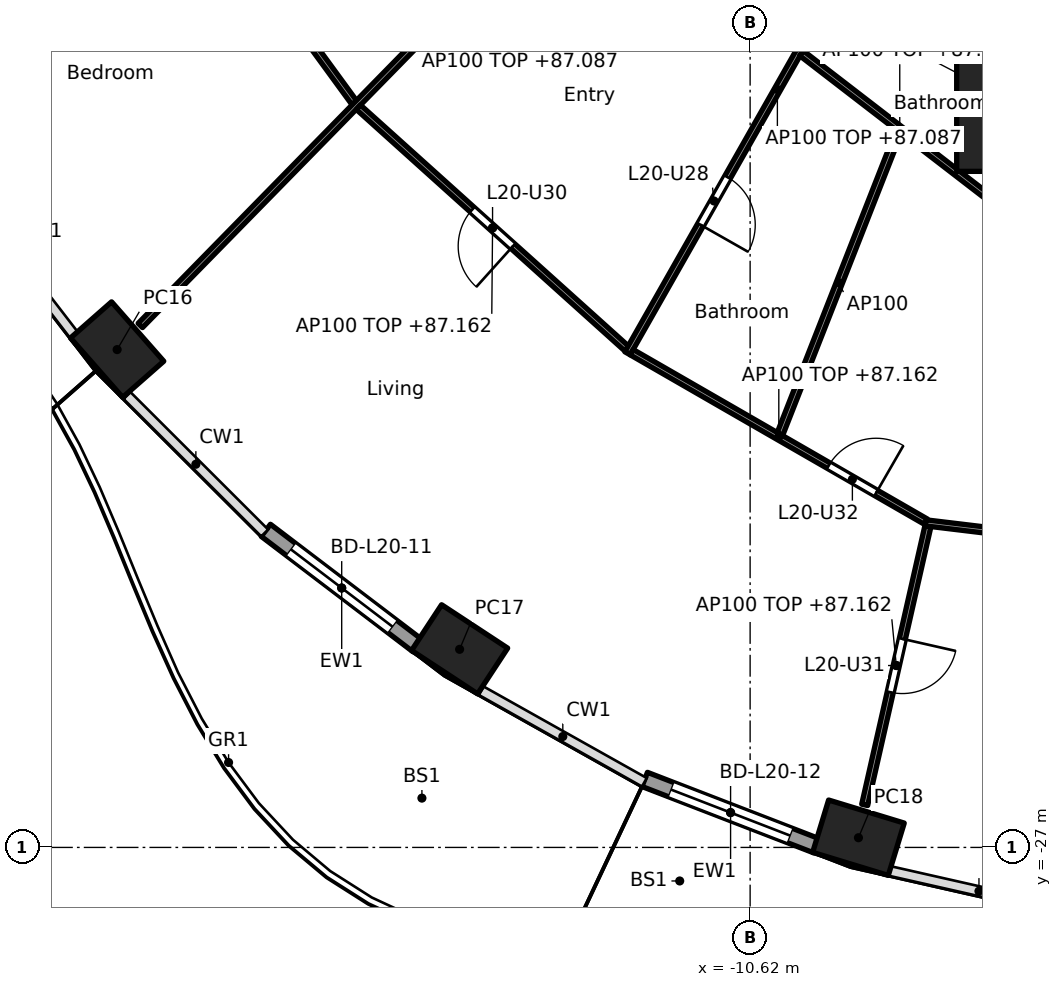
"""IFC4 building model, lengths in metres.
Left out: names, types, materials, properties, quantities, classifications, styles, units other than length and angle.
Written with IfcOpenShell. Run it as: python <this file> out.ifc"""

import sys

from ifc_helpers import new_model, si_unit, direction, frame, frame_2d, origin, origin_2d, place, context, subcontext, project, spatial, rectangle, hollow_rectangle, extrude, element, fill, save


model = new_model("IFC4")
c1 = context("Model", 3, precision=1e-05, world=origin(), true_north=direction((0.0, 1.0)))
c2 = subcontext(c1, "Body", "Model", "MODEL_VIEW")
j1 = project(units=[si_unit("LENGTHUNIT", "METRE"), si_unit("PLANEANGLEUNIT", "RADIAN")], contexts=[c1])
p1 = place(None, origin())
s1 = spatial("IfcSite", under=j1, at=p1, CompositionType="ELEMENT")
p2 = place(p1, origin())
s2 = spatial("IfcBuilding", under=s1, at=p2, CompositionType="ELEMENT")
p3 = place(p2, frame((0.0, 0.0, 84.4)))
s3 = spatial("IfcBuildingStorey", under=s2, at=p3, CompositionType="ELEMENT", Elevation=84.4)
for number, where, z_axis, x_axis in (
    (1, (-21.03, -18.813, 0.0), (0.0, 0.0, 1.0), (0.66, -0.751, 0.0)),
    (2, (-15.397, -23.742, 0.0), (0.0, 0.0, 1.0), (0.836, -0.549, 0.0)),
    (3, (-8.839, -26.841, 0.0), (0.0, 0.0, 1.0), (0.957, -0.292, 0.0)),
):
    element("IfcColumn", number, at=place(p3, frame(where, z_axis=z_axis, x_axis=x_axis)), inside=s3, PredefinedType="COLUMN", context=c2, shape_type="SweptSolid", body=[
        extrude(hollow_rectangle(XDim=1.3, YDim=0.9, WallThickness=0.045, at=origin_2d()), origin(), (0.0, 0.0, 1.0), 3.7),
    ])
p4 = place(p3, frame((-6.123, -14.782, 0.0), z_axis=(0.0, 0.0, 1.0), x_axis=(1.0, 0.0, 0.0)))
e4 = element("IfcColumn", 4, at=p4, inside=s3, PredefinedType="COLUMN", context=c2, shape_type="SweptSolid", body=[
    extrude(rectangle(XDim=2.2, YDim=2.2, at=origin_2d()), origin(), (0.0, 0.0, 1.0), 3.7),
])
p5 = place(p3, frame((-16.089, -23.682, 0.0), z_axis=(0.0, 0.0, 1.0), x_axis=(-0.796037575978, 0.605247203736, 0.0)))
e5 = element("IfcWall", 5, at=p5, inside=s3, PredefinedType="SOLIDWALL", context=c2, shape_type="SweptSolid", body=[
    extrude(rectangle(XDim=3.134, YDim=0.25, at=frame_2d((1.567, 0.0))), origin(), (0.0, 0.0, 1.0), 3.44),
])
p6 = place(p5, frame((0.517, 0.0, 0.0)))
e6 = element("IfcOpeningElement", 6, at=p6, cuts=e5, PredefinedType="OPENING", context=c2, shape_type="SweptSolid", body=[
    extrude(rectangle(XDim=2.1, YDim=2.4, at=frame_2d((1.05, 1.2))), frame((0.0, 0.135, 0.0), z_axis=(0.0, -1.0, 0.0), x_axis=(1.0, 0.0, 0.0)), (0.0, 0.0, 1.0), 0.27),
])
p7 = place(p3, frame((-9.529, -26.973, 0.0), z_axis=(0.0, 0.0, 1.0), x_axis=(-0.932827091302, 0.360324322982, 0.0)))
e7 = element("IfcWall", 7, at=p7, inside=s3, PredefinedType="SOLIDWALL", context=c2, shape_type="SweptSolid", body=[
    extrude(rectangle(XDim=3.027, YDim=0.25, at=frame_2d((1.514, 0.0))), origin(), (0.0, 0.0, 1.0), 3.44),
])
p8 = place(p7, frame((0.464, 0.0, 0.0)))
e8 = element("IfcOpeningElement", 8, at=p8, cuts=e7, PredefinedType="OPENING", context=c2, shape_type="SweptSolid", body=[
    extrude(rectangle(XDim=2.1, YDim=2.4, at=frame_2d((1.05, 1.2))), frame((0.0, 0.135, 0.0), z_axis=(0.0, -1.0, 0.0), x_axis=(1.0, 0.0, 0.0)), (0.0, 0.0, 1.0), 0.27),
])
p9 = place(p3, frame((-20.76, -9.779, 0.0), z_axis=(0.0, 0.0, 1.0), x_axis=(0.589597019189, -0.807697564045, 0.0)))
e9 = element("IfcWall", 9, at=p9, inside=s3, PredefinedType="PARTITIONING", context=c2, shape_type="SweptSolid", body=[
    extrude(rectangle(XDim=6.158, YDim=0.1, at=frame_2d((3.079, 0.0))), origin(), (0.0, 0.0, 1.0), 2.762),
])
p10 = place(p9, frame((2.629, 0.0, 0.0)))
e10 = element("IfcOpeningElement", 10, at=p10, cuts=e9, PredefinedType="OPENING", context=c2, shape_type="SweptSolid", body=[
    extrude(rectangle(XDim=0.9, YDim=2.1, at=frame_2d((0.45, 1.05))), frame((0.0, 0.06, 0.0), z_axis=(0.0, -1.0, 0.0), x_axis=(1.0, 0.0, 0.0)), (0.0, 0.0, 1.0), 0.12),
])
p11 = place(p3, frame((-10.181, -7.729, 0.0), z_axis=(0.0, 0.0, 1.0), x_axis=(-0.699708106083, -0.714428839201, 0.0)))
e11 = element("IfcWall", 11, at=p11, inside=s3, PredefinedType="PARTITIONING", context=c2, shape_type="SweptSolid", body=[
    extrude(rectangle(XDim=14.959, YDim=0.1, at=frame_2d((7.48, 0.0))), origin(), (0.0, 0.0, 1.0), 2.687),
])
p12 = place(p11, frame((1.675, 0.0, 0.0)))
e12 = element("IfcOpeningElement", 12, at=p12, cuts=e11, PredefinedType="OPENING", context=c2, shape_type="SweptSolid", body=[
    extrude(rectangle(XDim=0.9, YDim=2.1, at=frame_2d((0.45, 1.05))), frame((0.0, 0.06, 0.0), z_axis=(0.0, -1.0, 0.0), x_axis=(1.0, 0.0, 0.0)), (0.0, 0.0, 1.0), 0.12),
])
p13 = place(p11, frame((6.619, 0.0, 0.0)))
e13 = element("IfcOpeningElement", 13, at=p13, cuts=e11, PredefinedType="OPENING", context=c2, shape_type="SweptSolid", body=[
    extrude(rectangle(XDim=0.9, YDim=2.1, at=frame_2d((0.45, 1.05))), frame((0.0, 0.06, 0.0), z_axis=(0.0, -1.0, 0.0), x_axis=(1.0, 0.0, 0.0)), (0.0, 0.0, 1.0), 0.12),
])
p14 = place(p3, frame((-17.063, -14.827, 0.0), z_axis=(0.0, 0.0, 1.0), x_axis=(0.743478142868, -0.668760234373, 0.0)))
e14 = element("IfcWall", 14, at=p14, inside=s3, PredefinedType="PARTITIONING", context=c2, shape_type="SweptSolid", body=[
    extrude(rectangle(XDim=5.937, YDim=0.1, at=frame_2d((2.969, 0.0))), origin(), (0.0, 0.0, 1.0), 2.762),
])
p15 = place(p14, frame((2.519, 0.0, 0.0)))
e15 = element("IfcOpeningElement", 15, at=p15, cuts=e14, PredefinedType="OPENING", context=c2, shape_type="SweptSolid", body=[
    extrude(rectangle(XDim=0.9, YDim=2.1, at=frame_2d((0.45, 1.05))), frame((0.0, 0.06, 0.0), z_axis=(0.0, -1.0, 0.0), x_axis=(1.0, 0.0, 0.0)), (0.0, 0.0, 1.0), 0.12),
])
p16 = place(p3, frame((-7.707, -10.198, 0.0), z_axis=(0.0, 0.0, 1.0), x_axis=(-0.493963587489, -0.869482589955, 0.0)))
e16 = element("IfcWall", 16, at=p16, inside=s3, PredefinedType="PARTITIONING", context=c2, shape_type="SweptSolid", body=[
    extrude(rectangle(XDim=9.978, YDim=0.1, at=frame_2d((4.989, 0.0))), origin(), (0.0, 0.0, 1.0), 2.687),
])
p17 = place(p16, frame((1.684, 0.0, 0.0)))
e17 = element("IfcOpeningElement", 17, at=p17, cuts=e16, PredefinedType="OPENING", context=c2, shape_type="SweptSolid", body=[
    extrude(rectangle(XDim=0.9, YDim=2.1, at=frame_2d((0.45, 1.05))), frame((0.0, 0.06, 0.0), z_axis=(0.0, -1.0, 0.0), x_axis=(1.0, 0.0, 0.0)), (0.0, 0.0, 1.0), 0.12),
])
p18 = place(p16, frame((6.648, 0.0, 0.0)))
e18 = element("IfcOpeningElement", 18, at=p18, cuts=e16, PredefinedType="OPENING", context=c2, shape_type="SweptSolid", body=[
    extrude(rectangle(XDim=0.9, YDim=2.1, at=frame_2d((0.45, 1.05))), frame((0.0, 0.06, 0.0), z_axis=(0.0, -1.0, 0.0), x_axis=(1.0, 0.0, 0.0)), (0.0, 0.0, 1.0), 0.12),
])
p19 = place(p3, frame((-9.775, -13.939, 0.0), z_axis=(0.0, 0.0, 1.0), x_axis=(0.792156642473, -0.61031783014, 0.0)))
e19 = element("IfcWall", 19, at=p19, inside=s3, PredefinedType="PARTITIONING", context=c2, shape_type="SweptSolid", body=[
    extrude(rectangle(XDim=4.08, YDim=0.1, at=frame_2d((2.04, 0.0))), origin(), (0.0, 0.0, 1.0), 2.762),
])
p20 = place(p3, frame((-12.568, -18.856, 0.0), z_axis=(0.0, 0.0, 1.0), x_axis=(0.866532513598, -0.499120629585, 0.0)))
e20 = element("IfcWall", 20, at=p20, inside=s3, PredefinedType="PARTITIONING", context=c2, shape_type="SweptSolid", body=[
    extrude(rectangle(XDim=5.585, YDim=0.1, at=frame_2d((2.792, 0.0))), origin(), (0.0, 0.0, 1.0), 2.762),
])
p21 = place(p20, frame((3.739, 0.0, 0.0)))
e21 = element("IfcOpeningElement", 21, at=p21, cuts=e20, PredefinedType="OPENING", context=c2, shape_type="SweptSolid", body=[
    extrude(rectangle(XDim=0.9, YDim=2.1, at=frame_2d((0.45, 1.05))), frame((0.0, 0.06, 0.0), z_axis=(0.0, -1.0, 0.0), x_axis=(1.0, 0.0, 0.0)), (0.0, 0.0, 1.0), 0.12),
])
p22 = place(p3, frame((-8.177, -15.231, 0.0), z_axis=(0.0, 0.0, 1.0), x_axis=(-0.365520869553, -0.930803144559, 0.0)))
e22 = element("IfcWall", 22, at=p22, inside=s3, PredefinedType="PARTITIONING", context=c2, shape_type="SweptSolid", body=[
    extrude(rectangle(XDim=5.342, YDim=0.1, at=frame_2d((2.671, 0.0))), origin(), (0.0, 0.0, 1.0), 3.44),
])
p23 = place(p3, frame((-7.696, -21.717, 0.0), z_axis=(0.0, 0.0, 1.0), x_axis=(-0.221196717441, -0.97522921008, 0.0)))
e23 = element("IfcWall", 23, at=p23, inside=s3, PredefinedType="PARTITIONING", context=c2, shape_type="SweptSolid", body=[
    extrude(rectangle(XDim=4.7, YDim=0.1, at=frame_2d((2.35, 0.0))), origin(), (0.0, 0.0, 1.0), 2.762),
])
p24 = place(p23, frame((1.9, 0.0, 0.0)))
e24 = element("IfcOpeningElement", 24, at=p24, cuts=e23, PredefinedType="OPENING", context=c2, shape_type="SweptSolid", body=[
    extrude(rectangle(XDim=0.9, YDim=2.1, at=frame_2d((0.45, 1.05))), frame((0.0, 0.06, 0.0), z_axis=(0.0, -1.0, 0.0), x_axis=(1.0, 0.0, 0.0)), (0.0, 0.0, 1.0), 0.12),
])
p25 = place(p3, frame((-7.735, -21.662, 0.0), z_axis=(0.0, 0.0, 1.0), x_axis=(0.992808347289, -0.119714600421, 0.0)))
e25 = element("IfcWall", 25, at=p25, inside=s3, PredefinedType="PARTITIONING", context=c2, shape_type="SweptSolid", body=[
    extrude(rectangle(XDim=6.053, YDim=0.1, at=frame_2d((3.026, 0.0))), origin(), (0.0, 0.0, 1.0), 2.762),
])
p26 = place(p6, origin())
e26 = element("IfcDoor", 26, at=p26, inside=s3, OperationType="SLIDING_TO_LEFT", PredefinedType="DOOR", context=c2, shape_type="SweptSolid", body=[
    extrude(rectangle(XDim=2.1, YDim=2.4, at=frame_2d((1.05, 1.2))), frame((0.0, 0.025, 0.0), z_axis=(0.0, -1.0, 0.0), x_axis=(1.0, 0.0, 0.0)), (0.0, 0.0, 1.0), 0.05),
])
fill(e6, e26)
p27 = place(p8, origin())
e27 = element("IfcDoor", 27, at=p27, inside=s3, OperationType="SLIDING_TO_LEFT", PredefinedType="DOOR", context=c2, shape_type="SweptSolid", body=[
    extrude(rectangle(XDim=2.1, YDim=2.4, at=frame_2d((1.05, 1.2))), frame((0.0, 0.025, 0.0), z_axis=(0.0, -1.0, 0.0), x_axis=(1.0, 0.0, 0.0)), (0.0, 0.0, 1.0), 0.05),
])
fill(e8, e27)
p28 = place(p18, origin())
e28 = element("IfcDoor", 28, at=p28, inside=s3, OperationType="SINGLE_SWING_RIGHT", PredefinedType="DOOR", context=c2, shape_type="SweptSolid", body=[
    extrude(rectangle(XDim=0.9, YDim=2.1, at=frame_2d((0.45, 1.05))), frame((0.0, 0.025, 0.0), z_axis=(0.0, -1.0, 0.0), x_axis=(1.0, 0.0, 0.0)), (0.0, 0.0, 1.0), 0.05),
])
fill(e18, e28)
p29 = place(p15, frame((0.9, 0.0, 0.0), x_axis=(-1.0, 0.0, 0.0)))
e29 = element("IfcDoor", 29, at=p29, inside=s3, OperationType="SINGLE_SWING_LEFT", PredefinedType="DOOR", context=c2, shape_type="SweptSolid", body=[
    extrude(rectangle(XDim=0.9, YDim=2.1, at=frame_2d((0.45, 1.05))), frame((0.0, 0.025, 0.0), z_axis=(0.0, -1.0, 0.0), x_axis=(1.0, 0.0, 0.0)), (0.0, 0.0, 1.0), 0.05),
])
fill(e15, e29)
p30 = place(p24, origin())
e30 = element("IfcDoor", 30, at=p30, inside=s3, OperationType="SINGLE_SWING_LEFT", PredefinedType="DOOR", context=c2, shape_type="SweptSolid", body=[
    extrude(rectangle(XDim=0.9, YDim=2.1, at=frame_2d((0.45, 1.05))), frame((0.0, 0.025, 0.0), z_axis=(0.0, -1.0, 0.0), x_axis=(1.0, 0.0, 0.0)), (0.0, 0.0, 1.0), 0.05),
])
fill(e24, e30)
p31 = place(p21, origin())
e31 = element("IfcDoor", 31, at=p31, inside=s3, OperationType="SINGLE_SWING_RIGHT", PredefinedType="DOOR", context=c2, shape_type="SweptSolid", body=[
    extrude(rectangle(XDim=0.9, YDim=2.1, at=frame_2d((0.45, 1.05))), frame((0.0, 0.025, 0.0), z_axis=(0.0, -1.0, 0.0), x_axis=(1.0, 0.0, 0.0)), (0.0, 0.0, 1.0), 0.05),
])
fill(e21, e31)
save(model, sys.argv[1])
